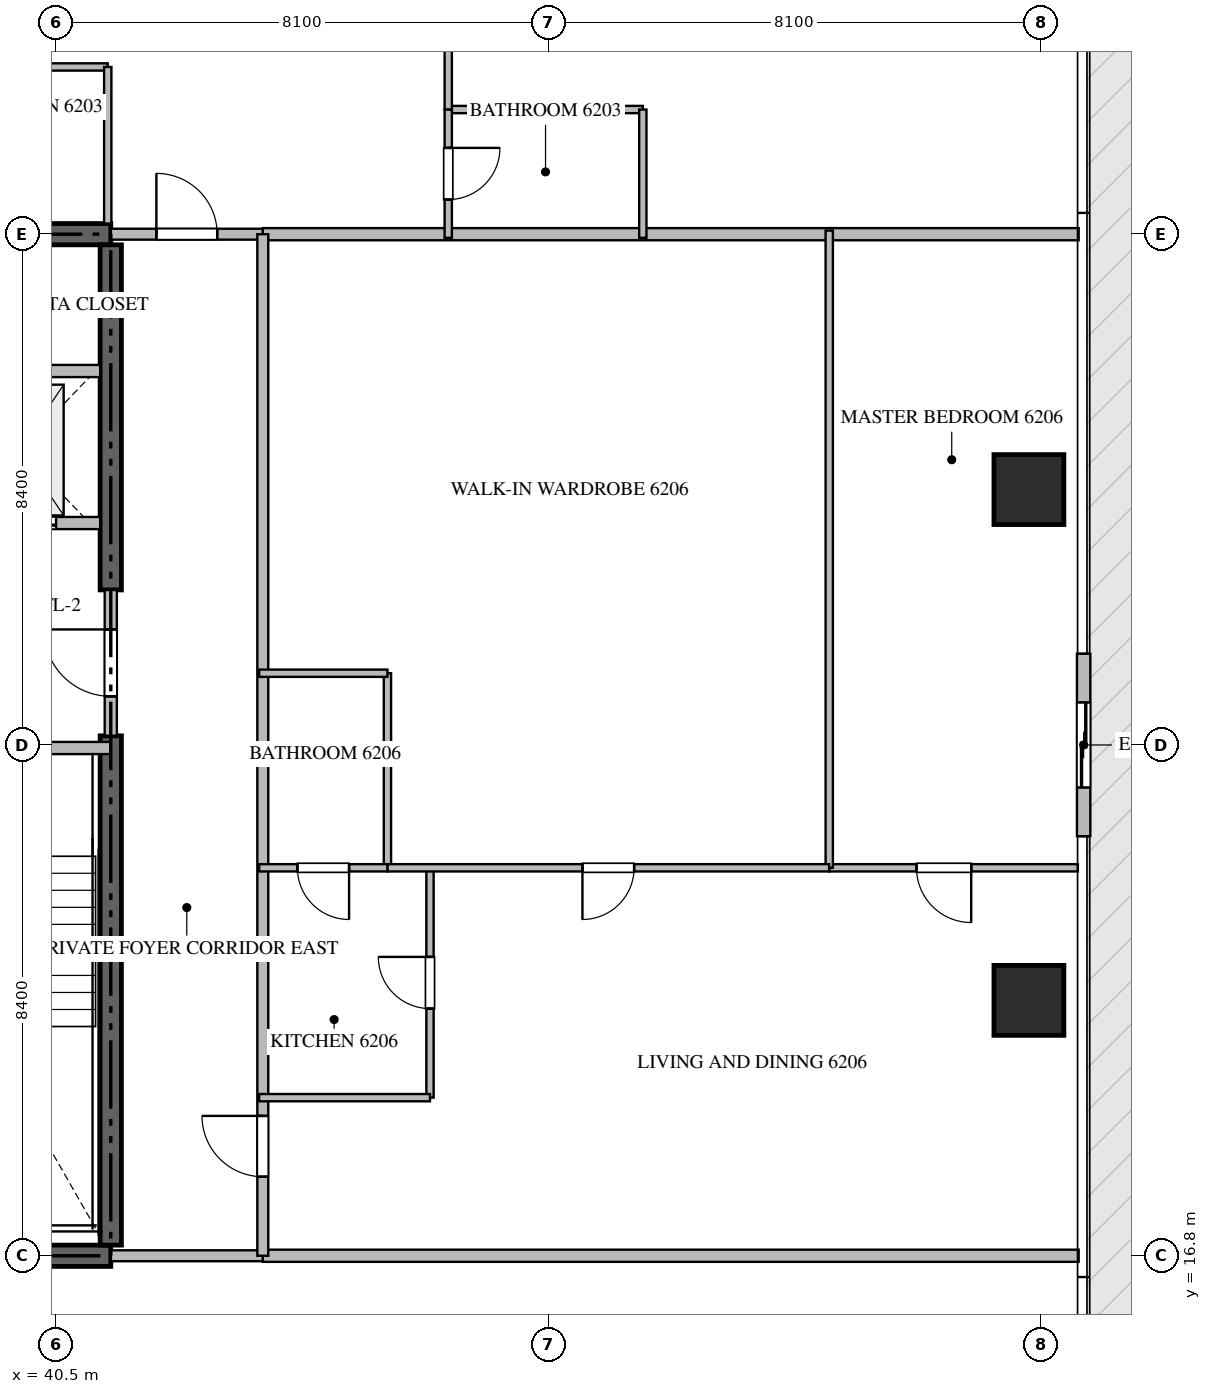
"""IFC4 building model, lengths in metres.
Left out: names, types, materials, properties, quantities, classifications, styles, units other than length and angle.
Written with IfcOpenShell. Run it as: python <this file> out.ifc"""

import sys

from ifc_helpers import new_model, si_unit, direction, frame, frame_2d, origin, origin_2d, place, context, subcontext, project, spatial, rectangle, extrude, source, transform, mapped, element, fill, save


model = new_model("IFC4")
c1 = context("Model", 3, precision=1e-05, world=origin(), true_north=direction((0.0, 1.0)))
c2 = subcontext(c1, "Body", "Model", "MODEL_VIEW")
j1 = project(units=[si_unit("LENGTHUNIT", "METRE"), si_unit("PLANEANGLEUNIT", "RADIAN")], contexts=[c1])
p1 = place(None, origin())
s1 = spatial("IfcSite", under=j1, at=p1, CompositionType="ELEMENT")
p2 = place(p1, origin())
s2 = spatial("IfcBuilding", under=s1, at=p2, CompositionType="ELEMENT")
p3 = place(p2, frame((0.0, 0.0, 248.95)))
s3 = spatial("IfcBuildingStorey", under=s2, at=p3, CompositionType="ELEMENT", Elevation=248.95)
for number, where, z_axis, x_axis in (
    (1, (23.4, 16.8, -0.26), (0.0, 0.0, 1.0), (1.0, 0.0, 0.0)),
    (2, (41.4, 33.6, -0.26), (0.0, 0.0, 1.0), (-1.0, 0.0, 0.0)),
):
    element("IfcWall", number, at=place(p3, frame(where, z_axis=z_axis, x_axis=x_axis)), inside=s3, PredefinedType="SHEAR", context=c2, shape_type="SweptSolid", body=[
        extrude(rectangle(XDim=18.0, YDim=0.35, at=frame_2d((9.0, 0.0))), origin(), (0.0, 0.0, 1.0), 3.848),
    ])
p4 = place(p3, frame((41.4, 16.975, -0.26), z_axis=(0.0, 0.0, 1.0), x_axis=(0.0, 1.0, 0.0)))
e3 = element("IfcWall", 3, at=p4, inside=s3, PredefinedType="SHEAR", context=c2, shape_type="SweptSolid", body=[
    extrude(rectangle(XDim=8.375, YDim=0.35, at=frame_2d((4.188, 0.0))), origin(), (0.0, 0.0, 1.0), 3.848),
])
p5 = place(p3, frame((41.4, 27.75, -0.26), z_axis=(0.0, 0.0, 1.0), x_axis=(0.0, 1.0, 0.0)))
e4 = element("IfcWall", 4, at=p5, inside=s3, PredefinedType="SHEAR", context=c2, shape_type="SweptSolid", body=[
    extrude(rectangle(XDim=5.675, YDim=0.35, at=frame_2d((2.837, 0.0))), origin(), (0.0, 0.0, 1.0), 3.848),
])
m1 = source(origin(), c2, "Body", "SweptSolid", [
    extrude(rectangle(XDim=1.15, YDim=1.15, at=origin_2d()), origin(), (0.0, 0.0, 1.0), 3.85),
])
for number, where, z_axis, x_axis in (
    (5, (56.5, 21.0, -0.26), (0.0, 0.0, 1.0), (1.0, 0.0, 0.0)),
    (6, (56.5, 29.4, -0.26), (0.0, 0.0, 1.0), (1.0, 0.0, 0.0)),
):
    element("IfcColumn", number, at=place(p3, frame(where, z_axis=z_axis, x_axis=x_axis)), inside=s3, PredefinedType="COLUMN", context=c2, shape_type="MappedRepresentation", body=[
        mapped(m1, transform((0.0, 0.0, 0.0), scale=1.0)),
    ])
p6 = place(p3, frame((57.4, 23.7, 0.0), z_axis=(0.0, 0.0, 1.0), x_axis=(0.0, 1.0, 0.0)))
e7 = element("IfcWall", 7, at=p6, inside=s3, PredefinedType="ELEMENTEDWALL", context=c2, shape_type="SweptSolid", body=[
    extrude(rectangle(XDim=3.0, YDim=0.22, at=frame_2d((1.5, 0.0))), origin(), (0.0, 0.0, 1.0), 3.575),
])
p7 = place(p6, frame((0.8, 0.0, 0.0)))
e8 = element("IfcOpeningElement", 8, at=p7, cuts=e7, PredefinedType="OPENING", context=c2, shape_type="SweptSolid", body=[
    extrude(rectangle(XDim=1.4, YDim=2.25, at=frame_2d((0.7, 1.125))), frame((0.0, 0.12, 0.0), z_axis=(0.0, -1.0, 0.0), x_axis=(1.0, 0.0, 0.0)), (0.0, 0.0, 1.0), 0.24),
])
p8 = place(p3, frame((36.95, 25.15, 0.0), z_axis=(0.0, 0.0, 1.0), x_axis=(1.0, 0.0, 0.0)))
e9 = element("IfcWall", 9, at=p8, inside=s3, PredefinedType="STANDARD", context=c2, shape_type="SweptSolid", body=[
    extrude(rectangle(XDim=4.45, YDim=0.2, at=frame_2d((2.225, 0.0))), origin(), (0.0, 0.0, 1.0), 3.59),
])
p9 = place(p8, frame((1.65, 0.0, 0.0)))
e10 = element("IfcOpeningElement", 10, at=p9, cuts=e9, PredefinedType="OPENING", context=c2, shape_type="SweptSolid", body=[
    extrude(rectangle(XDim=1.1, YDim=2.15, at=frame_2d((0.55, 1.075))), frame((0.0, 0.11, 0.0), z_axis=(0.0, -1.0, 0.0), x_axis=(1.0, 0.0, 0.0)), (0.0, 0.0, 1.0), 0.22),
])
p10 = place(p3, frame((38.75, 28.85, 0.0), z_axis=(0.0, 0.0, 1.0), x_axis=(1.0, 0.0, 0.0)))
e11 = element("IfcWall", 11, at=p10, inside=s3, PredefinedType="STANDARD", context=c2, shape_type="SweptSolid", body=[
    extrude(rectangle(XDim=2.475, YDim=0.2, at=frame_2d((1.238, 0.0))), origin(), (0.0, 0.0, 1.0), 3.59),
])
p11 = place(p10, frame((0.55, 0.0, 0.0)))
e12 = element("IfcOpeningElement", 12, at=p11, cuts=e11, PredefinedType="OPENING", context=c2, shape_type="SweptSolid", body=[
    extrude(rectangle(XDim=1.2, YDim=2.2, at=frame_2d((0.6, 1.1))), frame((0.0, 0.11, 0.0), z_axis=(0.0, -1.0, 0.0), x_axis=(1.0, 0.0, 0.0)), (0.0, 0.0, 1.0), 0.22),
])
p12 = place(p3, frame((38.75, 31.35, 0.0), z_axis=(0.0, 0.0, 1.0), x_axis=(1.0, 0.0, 0.0)))
e13 = element("IfcWall", 13, at=p12, inside=s3, PredefinedType="STANDARD", context=c2, shape_type="SweptSolid", body=[
    extrude(rectangle(XDim=2.475, YDim=0.2, at=frame_2d((1.238, 0.0))), origin(), (0.0, 0.0, 1.0), 3.59),
])
p13 = place(p3, frame((41.4, 25.352, 0.0), z_axis=(0.0, 0.0, 1.0), x_axis=(0.0, 1.0, 0.0)))
e14 = element("IfcWall", 14, at=p13, inside=s3, PredefinedType="STANDARD", context=c2, shape_type="SweptSolid", body=[
    extrude(rectangle(XDim=2.396, YDim=0.2, at=frame_2d((1.198, 0.0))), origin(), (0.0, 0.0, 1.0), 3.59),
])
p14 = place(p13, frame((0.648, 0.0, 0.0)))
e15 = element("IfcOpeningElement", 15, at=p14, cuts=e14, PredefinedType="OPENING", context=c2, shape_type="SweptSolid", body=[
    extrude(rectangle(XDim=1.1, YDim=2.15, at=frame_2d((0.55, 1.075))), frame((0.0, 0.11, 0.0), z_axis=(0.0, -1.0, 0.0), x_axis=(1.0, 0.0, 0.0)), (0.0, 0.0, 1.0), 0.22),
])
for number, where, z_axis, x_axis in (
    (16, (43.9, 16.8, 0.0), (0.0, 0.0, 1.0), (1.0, 0.0, 0.0)),
    (17, (43.9, 33.6, 0.0), (0.0, 0.0, 1.0), (1.0, 0.0, 0.0)),
):
    element("IfcWall", number, at=place(p3, frame(where, z_axis=z_axis, x_axis=x_axis)), inside=s3, PredefinedType="PARTITIONING", context=c2, shape_type="SweptSolid", body=[
        extrude(rectangle(XDim=13.418, YDim=0.2, at=frame_2d((6.709, 0.0))), origin(), (0.0, 0.0, 1.0), 3.59),
    ])
p15 = place(p3, frame((41.402, 16.8, 0.0), z_axis=(0.0, 0.0, 1.0), x_axis=(1.0, 0.0, 0.0)))
e18 = element("IfcWall", 18, at=p15, inside=s3, PredefinedType="PARTITIONING", context=c2, shape_type="SweptSolid", body=[
    extrude(rectangle(XDim=2.496, YDim=0.18, at=frame_2d((1.248, 0.0))), origin(), (0.0, 0.0, 1.0), 3.59),
])
p16 = place(p3, frame((41.402, 33.6, 0.0), z_axis=(0.0, 0.0, 1.0), x_axis=(1.0, 0.0, 0.0)))
e19 = element("IfcWall", 19, at=p16, inside=s3, PredefinedType="PARTITIONING", context=c2, shape_type="SweptSolid", body=[
    extrude(rectangle(XDim=2.496, YDim=0.18, at=frame_2d((1.248, 0.0))), origin(), (0.0, 0.0, 1.0), 3.59),
])
p17 = place(p16, frame((0.748, 0.0, 0.0)))
e20 = element("IfcOpeningElement", 20, at=p17, cuts=e19, PredefinedType="OPENING", context=c2, shape_type="SweptSolid", body=[
    extrude(rectangle(XDim=1.0, YDim=2.15, at=frame_2d((0.5, 1.075))), frame((0.0, 0.1, 0.0), z_axis=(0.0, -1.0, 0.0), x_axis=(1.0, 0.0, 0.0)), (0.0, 0.0, 1.0), 0.2),
])
p18 = place(p3, frame((43.9, 16.8, 0.0), z_axis=(0.0, 0.0, 1.0), x_axis=(0.0, 1.0, 0.0)))
e21 = element("IfcWall", 21, at=p18, inside=s3, PredefinedType="PARTITIONING", context=c2, shape_type="SweptSolid", body=[
    extrude(rectangle(XDim=16.8, YDim=0.18, at=frame_2d((8.4, 0.0))), origin(), (0.0, 0.0, 1.0), 3.59),
])
p19 = place(p18, frame((1.3, 0.0, 0.0)))
e22 = element("IfcOpeningElement", 22, at=p19, cuts=e21, PredefinedType="OPENING", context=c2, shape_type="SweptSolid", body=[
    extrude(rectangle(XDim=1.0, YDim=2.15, at=frame_2d((0.5, 1.075))), frame((0.0, 0.1, 0.0), z_axis=(0.0, -1.0, 0.0), x_axis=(1.0, 0.0, 0.0)), (0.0, 0.0, 1.0), 0.2),
])
p20 = place(p3, frame((38.5, 36.35, 0.0), z_axis=(0.0, 0.0, 1.0), x_axis=(1.0, 0.0, 0.0)))
e23 = element("IfcWall", 23, at=p20, inside=s3, PredefinedType="PARTITIONING", context=c2, shape_type="SweptSolid", body=[
    extrude(rectangle(XDim=2.85, YDim=0.12, at=frame_2d((1.425, 0.0))), origin(), (0.0, 0.0, 1.0), 3.59),
])
p21 = place(p20, frame((1.0, 0.0, 0.0)))
e24 = element("IfcOpeningElement", 24, at=p21, cuts=e23, PredefinedType="OPENING", context=c2, shape_type="SweptSolid", body=[
    extrude(rectangle(XDim=0.85, YDim=2.1, at=frame_2d((0.425, 1.05))), frame((0.0, 0.07, 0.0), z_axis=(0.0, -1.0, 0.0), x_axis=(1.0, 0.0, 0.0)), (0.0, 0.0, 1.0), 0.14),
])
p22 = place(p3, frame((41.35, 36.35, 0.0), z_axis=(0.0, 0.0, 1.0), x_axis=(0.0, -1.0, 0.0)))
e25 = element("IfcWall", 25, at=p22, inside=s3, PredefinedType="PARTITIONING", context=c2, shape_type="SweptSolid", body=[
    extrude(rectangle(XDim=2.575, YDim=0.12, at=frame_2d((1.288, 0.0))), origin(), (0.0, 0.0, 1.0), 3.59),
])
p23 = place(p3, frame((46.95, 35.65, 0.0), z_axis=(0.0, 0.0, 1.0), x_axis=(1.0, 0.0, 0.0)))
e26 = element("IfcWall", 26, at=p23, inside=s3, PredefinedType="PARTITIONING", context=c2, shape_type="SweptSolid", body=[
    extrude(rectangle(XDim=3.2, YDim=0.12, at=frame_2d((1.6, 0.0))), origin(), (0.0, 0.0, 1.0), 3.59),
])
p24 = place(p3, frame((50.15, 35.65, 0.0), z_axis=(0.0, 0.0, 1.0), x_axis=(0.0, -1.0, 0.0)))
e27 = element("IfcWall", 27, at=p24, inside=s3, PredefinedType="PARTITIONING", context=c2, shape_type="SweptSolid", body=[
    extrude(rectangle(XDim=2.11, YDim=0.12, at=frame_2d((1.055, 0.0))), origin(), (0.0, 0.0, 1.0), 3.59),
])
p25 = place(p3, frame((46.95, 41.73, 0.0), z_axis=(0.0, 0.0, 1.0), x_axis=(0.0, -1.0, 0.0)))
e28 = element("IfcWall", 28, at=p25, inside=s3, PredefinedType="PARTITIONING", context=c2, shape_type="SweptSolid", body=[
    extrude(rectangle(XDim=6.08, YDim=0.12, at=frame_2d((3.04, 0.0))), origin(), (0.0, 0.0, 1.0), 3.59),
])
p26 = place(p25, frame((2.615, 0.0, 0.0)))
e29 = element("IfcOpeningElement", 29, at=p26, cuts=e28, PredefinedType="OPENING", context=c2, shape_type="SweptSolid", body=[
    extrude(rectangle(XDim=0.85, YDim=2.1, at=frame_2d((0.425, 1.05))), frame((0.0, 0.07, 0.0), z_axis=(0.0, -1.0, 0.0), x_axis=(1.0, 0.0, 0.0)), (0.0, 0.0, 1.0), 0.14),
])
p27 = place(p3, frame((46.95, 35.648, 0.0), z_axis=(0.0, 0.0, 1.0), x_axis=(0.0, -1.0, 0.0)))
e30 = element("IfcWall", 30, at=p27, inside=s3, PredefinedType="PARTITIONING", context=c2, shape_type="SweptSolid", body=[
    extrude(rectangle(XDim=2.108, YDim=0.12, at=frame_2d((1.054, 0.0))), origin(), (0.0, 0.0, 1.0), 3.59),
])
p28 = place(p27, frame((0.629, 0.0, 0.0)))
e31 = element("IfcOpeningElement", 31, at=p28, cuts=e30, PredefinedType="OPENING", context=c2, shape_type="SweptSolid", body=[
    extrude(rectangle(XDim=0.85, YDim=2.1, at=frame_2d((0.425, 1.05))), frame((0.0, 0.07, 0.0), z_axis=(0.0, -1.0, 0.0), x_axis=(1.0, 0.0, 0.0)), (0.0, 0.0, 1.0), 0.14),
])
p29 = place(p3, frame((46.65, 19.4, 0.0), z_axis=(0.0, 0.0, 1.0), x_axis=(0.0, 1.0, 0.0)))
e32 = element("IfcWall", 32, at=p29, inside=s3, PredefinedType="PARTITIONING", context=c2, shape_type="SweptSolid", body=[
    extrude(rectangle(XDim=3.78, YDim=0.12, at=frame_2d((1.89, 0.0))), origin(), (0.0, 0.0, 1.0), 3.59),
])
p30 = place(p29, frame((1.465, 0.0, 0.0)))
e33 = element("IfcOpeningElement", 33, at=p30, cuts=e32, PredefinedType="OPENING", context=c2, shape_type="SweptSolid", body=[
    extrude(rectangle(XDim=0.85, YDim=2.1, at=frame_2d((0.425, 1.05))), frame((0.0, 0.07, 0.0), z_axis=(0.0, -1.0, 0.0), x_axis=(1.0, 0.0, 0.0)), (0.0, 0.0, 1.0), 0.14),
])
p31 = place(p3, frame((46.65, 19.4, 0.0), z_axis=(0.0, 0.0, 1.0), x_axis=(-1.0, 0.0, 0.0)))
e34 = element("IfcWall", 34, at=p31, inside=s3, PredefinedType="PARTITIONING", context=c2, shape_type="SweptSolid", body=[
    extrude(rectangle(XDim=2.81, YDim=0.12, at=frame_2d((1.405, 0.0))), origin(), (0.0, 0.0, 1.0), 3.59),
])
p32 = place(p3, frame((57.305, 23.18, 0.0), z_axis=(0.0, 0.0, 1.0), x_axis=(-1.0, 0.0, 0.0)))
e35 = element("IfcWall", 35, at=p32, inside=s3, PredefinedType="PARTITIONING", context=c2, shape_type="SweptSolid", body=[
    extrude(rectangle(XDim=4.089, YDim=0.12, at=frame_2d((2.044, 0.0))), origin(), (0.0, 0.0, 1.0), 3.59),
])
p33 = place(p32, frame((1.754, 0.0, 0.0)))
e36 = element("IfcOpeningElement", 36, at=p33, cuts=e35, PredefinedType="OPENING", context=c2, shape_type="SweptSolid", body=[
    extrude(rectangle(XDim=0.9, YDim=2.1, at=frame_2d((0.45, 1.05))), frame((0.0, 0.07, 0.0), z_axis=(0.0, -1.0, 0.0), x_axis=(1.0, 0.0, 0.0)), (0.0, 0.0, 1.0), 0.14),
])
p34 = place(p3, frame((53.216, 23.18, 0.0), z_axis=(0.0, 0.0, 1.0), x_axis=(0.0, 1.0, 0.0)))
e37 = element("IfcWall", 37, at=p34, inside=s3, PredefinedType="PARTITIONING", context=c2, shape_type="SweptSolid", body=[
    extrude(rectangle(XDim=10.48, YDim=0.12, at=frame_2d((5.24, 0.0))), origin(), (0.0, 0.0, 1.0), 3.59),
])
p35 = place(p3, frame((45.95, 23.18, 0.0), z_axis=(0.0, 0.0, 1.0), x_axis=(0.0, 1.0, 0.0)))
e38 = element("IfcWall", 38, at=p35, inside=s3, PredefinedType="PARTITIONING", context=c2, shape_type="SweptSolid", body=[
    extrude(rectangle(XDim=3.2, YDim=0.12, at=frame_2d((1.6, 0.0))), origin(), (0.0, 0.0, 1.0), 3.59),
])
p36 = place(p3, frame((45.95, 26.38, 0.0), z_axis=(0.0, 0.0, 1.0), x_axis=(-1.0, 0.0, 0.0)))
e39 = element("IfcWall", 39, at=p36, inside=s3, PredefinedType="PARTITIONING", context=c2, shape_type="SweptSolid", body=[
    extrude(rectangle(XDim=2.11, YDim=0.12, at=frame_2d((1.055, 0.0))), origin(), (0.0, 0.0, 1.0), 3.59),
])
p37 = place(p3, frame((53.214, 23.18, 0.0), z_axis=(0.0, 0.0, 1.0), x_axis=(-1.0, 0.0, 0.0)))
e40 = element("IfcWall", 40, at=p37, inside=s3, PredefinedType="PARTITIONING", context=c2, shape_type="SweptSolid", body=[
    extrude(rectangle(XDim=7.264, YDim=0.12, at=frame_2d((3.632, 0.0))), origin(), (0.0, 0.0, 1.0), 3.59),
])
p38 = place(p37, frame((3.207, 0.0, 0.0)))
e41 = element("IfcOpeningElement", 41, at=p38, cuts=e40, PredefinedType="OPENING", context=c2, shape_type="SweptSolid", body=[
    extrude(rectangle(XDim=0.85, YDim=2.1, at=frame_2d((0.425, 1.05))), frame((0.0, 0.07, 0.0), z_axis=(0.0, -1.0, 0.0), x_axis=(1.0, 0.0, 0.0)), (0.0, 0.0, 1.0), 0.14),
])
p39 = place(p3, frame((45.948, 23.18, 0.0), z_axis=(0.0, 0.0, 1.0), x_axis=(-1.0, 0.0, 0.0)))
e42 = element("IfcWall", 42, at=p39, inside=s3, PredefinedType="PARTITIONING", context=c2, shape_type="SweptSolid", body=[
    extrude(rectangle(XDim=2.108, YDim=0.12, at=frame_2d((1.054, 0.0))), origin(), (0.0, 0.0, 1.0), 3.59),
])
p40 = place(p39, frame((0.629, 0.0, 0.0)))
e43 = element("IfcOpeningElement", 43, at=p40, cuts=e42, PredefinedType="OPENING", context=c2, shape_type="SweptSolid", body=[
    extrude(rectangle(XDim=0.85, YDim=2.1, at=frame_2d((0.425, 1.05))), frame((0.0, 0.07, 0.0), z_axis=(0.0, -1.0, 0.0), x_axis=(1.0, 0.0, 0.0)), (0.0, 0.0, 1.0), 0.14),
])
m2 = source(origin(), c2, "Body", "SweptSolid", [
    extrude(rectangle(XDim=1.4, YDim=2.25, at=frame_2d((0.7, 1.125))), frame((0.0, 0.025, 0.0), z_axis=(0.0, -1.0, 0.0), x_axis=(1.0, 0.0, 0.0)), (0.0, 0.0, 1.0), 0.05),
])
p41 = place(p7, origin())
e44 = element("IfcDoor", 44, at=p41, inside=s3, OperationType="SLIDING_TO_LEFT", PredefinedType="DOOR", context=c2, shape_type="MappedRepresentation", body=[
    mapped(m2, transform((0.0, 0.0, 0.0), scale=1.0)),
])
fill(e8, e44)
m3 = source(origin(), c2, "Body", "SweptSolid", [
    extrude(rectangle(XDim=1.2, YDim=2.2, at=frame_2d((0.6, 1.1))), frame((0.0, 0.025, 0.0), z_axis=(0.0, -1.0, 0.0), x_axis=(1.0, 0.0, 0.0)), (0.0, 0.0, 1.0), 0.05),
])
p42 = place(p11, origin())
e45 = element("IfcDoor", 45, at=p42, inside=s3, OperationType="DOUBLE_DOOR_SLIDING", PredefinedType="DOOR", context=c2, shape_type="MappedRepresentation", body=[
    mapped(m3, transform((0.0, 0.0, 0.0), scale=1.0)),
])
fill(e12, e45)
m4 = source(origin(), c2, "Body", "SweptSolid", [
    extrude(rectangle(XDim=1.1, YDim=2.15, at=frame_2d((0.55, 1.075))), frame((0.0, 0.025, 0.0), z_axis=(0.0, -1.0, 0.0), x_axis=(1.0, 0.0, 0.0)), (0.0, 0.0, 1.0), 0.05),
])
p43 = place(p14, origin())
e46 = element("IfcDoor", 46, at=p43, inside=s3, OperationType="SINGLE_SWING_RIGHT", PredefinedType="DOOR", context=c2, shape_type="MappedRepresentation", body=[
    mapped(m4, transform((0.0, 0.0, 0.0), scale=1.0)),
])
fill(e15, e46)
m5 = source(origin(), c2, "Body", "SweptSolid", [
    extrude(rectangle(XDim=1.0, YDim=2.15, at=frame_2d((0.5, 1.075))), frame((0.0, 0.025, 0.0), z_axis=(0.0, -1.0, 0.0), x_axis=(1.0, 0.0, 0.0)), (0.0, 0.0, 1.0), 0.05),
])
p44 = place(p17, origin())
e47 = element("IfcDoor", 47, at=p44, inside=s3, OperationType="SINGLE_SWING_LEFT", PredefinedType="DOOR", context=c2, shape_type="MappedRepresentation", body=[
    mapped(m5, transform((0.0, 0.0, 0.0), scale=1.0)),
])
fill(e20, e47)
p45 = place(p19, origin())
e48 = element("IfcDoor", 48, at=p45, inside=s3, OperationType="SINGLE_SWING_RIGHT", PredefinedType="DOOR", context=c2, shape_type="MappedRepresentation", body=[
    mapped(m5, transform((0.0, 0.0, 0.0), scale=1.0)),
])
fill(e22, e48)
m6 = source(origin(), c2, "Body", "SweptSolid", [
    extrude(rectangle(XDim=0.85, YDim=2.1, at=frame_2d((0.425, 1.05))), frame((0.0, 0.025, 0.0), z_axis=(0.0, -1.0, 0.0), x_axis=(1.0, 0.0, 0.0)), (0.0, 0.0, 1.0), 0.05),
])
p46 = place(p28, origin())
e49 = element("IfcDoor", 49, at=p46, inside=s3, OperationType="SINGLE_SWING_LEFT", PredefinedType="DOOR", context=c2, shape_type="MappedRepresentation", body=[
    mapped(m6, transform((0.0, 0.0, 0.0), scale=1.0)),
])
fill(e31, e49)
p47 = place(p30, origin())
e50 = element("IfcDoor", 50, at=p47, inside=s3, OperationType="SINGLE_SWING_RIGHT", PredefinedType="DOOR", context=c2, shape_type="MappedRepresentation", body=[
    mapped(m6, transform((0.0, 0.0, 0.0), scale=1.0)),
])
fill(e33, e50)
m7 = source(origin(), c2, "Body", "SweptSolid", [
    extrude(rectangle(XDim=0.9, YDim=2.1, at=frame_2d((0.45, 1.05))), frame((0.0, 0.025, 0.0), z_axis=(0.0, -1.0, 0.0), x_axis=(1.0, 0.0, 0.0)), (0.0, 0.0, 1.0), 0.05),
])
p48 = place(p33, origin())
e51 = element("IfcDoor", 51, at=p48, inside=s3, OperationType="SINGLE_SWING_LEFT", PredefinedType="DOOR", context=c2, shape_type="MappedRepresentation", body=[
    mapped(m7, transform((0.0, 0.0, 0.0), scale=1.0)),
])
fill(e36, e51)
p49 = place(p38, origin())
e52 = element("IfcDoor", 52, at=p49, inside=s3, OperationType="SINGLE_SWING_RIGHT", PredefinedType="DOOR", context=c2, shape_type="MappedRepresentation", body=[
    mapped(m6, transform((0.0, 0.0, 0.0), scale=1.0)),
])
fill(e41, e52)
p50 = place(p40, origin())
e53 = element("IfcDoor", 53, at=p50, inside=s3, OperationType="SINGLE_SWING_LEFT", PredefinedType="DOOR", context=c2, shape_type="MappedRepresentation", body=[
    mapped(m6, transform((0.0, 0.0, 0.0), scale=1.0)),
])
fill(e43, e53)
save(model, sys.argv[1])
